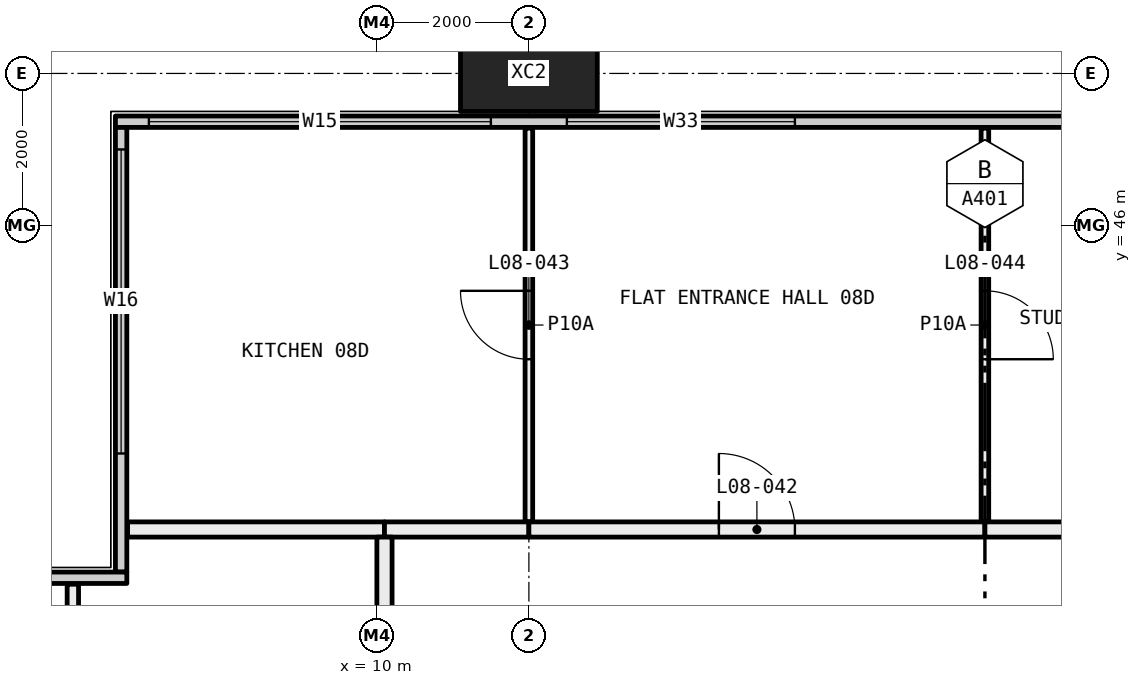
"""IFC4 building model, lengths in metres.
Left out: names, types, materials, properties, quantities, classifications, styles, units other than length and angle.
Written with IfcOpenShell. Run it as: python <this file> out.ifc"""

import sys

from ifc_helpers import new_model, si_unit, direction, frame, frame_2d, origin, origin_2d, place, context, subcontext, project, spatial, rectangle, hollow_rectangle, extrude, element, fill, save


model = new_model("IFC4")
c1 = context("Model", 3, precision=1e-05, world=origin(), true_north=direction((0.0, 1.0)))
c2 = subcontext(c1, "Body", "Model", "MODEL_VIEW")
j1 = project(units=[si_unit("LENGTHUNIT", "METRE"), si_unit("PLANEANGLEUNIT", "RADIAN")], contexts=[c1])
p1 = place(None, origin())
s1 = spatial("IfcSite", under=j1, at=p1, CompositionType="ELEMENT")
p2 = place(p1, origin())
s2 = spatial("IfcBuilding", under=s1, at=p2, CompositionType="ELEMENT")
p3 = place(p2, frame((0.0, 0.0, 40.35)))
s3 = spatial("IfcBuildingStorey", under=s2, at=p3, CompositionType="ELEMENT", Elevation=40.35)
p4 = place(p3, frame((12.0, 48.0, -0.4), z_axis=(0.0, 0.0, 1.0), x_axis=(1.0, 0.0, 0.0)))
e1 = element("IfcColumn", 1, at=p4, inside=s3, PredefinedType="COLUMN", context=c2, shape_type="SweptSolid", body=[
    extrude(hollow_rectangle(XDim=1.8, YDim=1.0, WallThickness=0.07, at=origin_2d()), origin(), (0.0, 0.0, 1.0), 3.45),
])
p5 = place(p3, frame((6.56, 47.365, 0.0), z_axis=(0.0, 0.0, 1.0), x_axis=(1.0, 0.0, 0.0)))
e2 = element("IfcWall", 2, at=p5, inside=s3, PredefinedType="ELEMENTEDWALL", context=c2, shape_type="SweptSolid", body=[
    extrude(rectangle(XDim=58.88, YDim=0.15, at=frame_2d((29.44, 0.0))), origin(), (0.0, 0.0, 1.0), 3.05),
])
p6 = place(p5, frame((0.44, 0.0, 0.45)))
e3 = element("IfcOpeningElement", 3, at=p6, cuts=e2, PredefinedType="OPENING", context=c2, shape_type="SweptSolid", body=[
    extrude(rectangle(XDim=4.5, YDim=2.55, at=frame_2d((2.25, 1.275))), frame((0.0, 0.085, 0.0), z_axis=(0.0, -1.0, 0.0), x_axis=(1.0, 0.0, 0.0)), (0.0, 0.0, 1.0), 0.17),
])
p7 = place(p5, frame((5.94, 0.0, 0.45)))
e4 = element("IfcOpeningElement", 4, at=p7, cuts=e2, PredefinedType="OPENING", context=c2, shape_type="SweptSolid", body=[
    extrude(rectangle(XDim=3.0, YDim=2.55, at=frame_2d((1.5, 1.275))), frame((0.0, 0.085, 0.0), z_axis=(0.0, -1.0, 0.0), x_axis=(1.0, 0.0, 0.0)), (0.0, 0.0, 1.0), 0.17),
])
p8 = place(p5, frame((13.94, 0.0, 0.45)))
e5 = element("IfcOpeningElement", 5, at=p8, cuts=e2, PredefinedType="OPENING", context=c2, shape_type="SweptSolid", body=[
    extrude(rectangle(XDim=3.0, YDim=2.55, at=frame_2d((1.5, 1.275))), frame((0.0, 0.085, 0.0), z_axis=(0.0, -1.0, 0.0), x_axis=(1.0, 0.0, 0.0)), (0.0, 0.0, 1.0), 0.17),
])
p9 = place(p5, frame((17.94, 0.0, 0.45)))
e6 = element("IfcOpeningElement", 6, at=p9, cuts=e2, PredefinedType="OPENING", context=c2, shape_type="SweptSolid", body=[
    extrude(rectangle(XDim=3.0, YDim=2.55, at=frame_2d((1.5, 1.275))), frame((0.0, 0.085, 0.0), z_axis=(0.0, -1.0, 0.0), x_axis=(1.0, 0.0, 0.0)), (0.0, 0.0, 1.0), 0.17),
])
p10 = place(p5, frame((26.94, 0.0, 0.45)))
e7 = element("IfcOpeningElement", 7, at=p10, cuts=e2, PredefinedType="OPENING", context=c2, shape_type="SweptSolid", body=[
    extrude(rectangle(XDim=2.0, YDim=2.55, at=frame_2d((1.0, 1.275))), frame((0.0, 0.085, 0.0), z_axis=(0.0, -1.0, 0.0), x_axis=(1.0, 0.0, 0.0)), (0.0, 0.0, 1.0), 0.17),
])
p11 = place(p5, frame((29.94, 0.0, 0.45)))
e8 = element("IfcOpeningElement", 8, at=p11, cuts=e2, PredefinedType="OPENING", context=c2, shape_type="SweptSolid", body=[
    extrude(rectangle(XDim=3.0, YDim=2.55, at=frame_2d((1.5, 1.275))), frame((0.0, 0.085, 0.0), z_axis=(0.0, -1.0, 0.0), x_axis=(1.0, 0.0, 0.0)), (0.0, 0.0, 1.0), 0.17),
])
p12 = place(p5, frame((37.94, 0.0, 0.45)))
e9 = element("IfcOpeningElement", 9, at=p12, cuts=e2, PredefinedType="OPENING", context=c2, shape_type="SweptSolid", body=[
    extrude(rectangle(XDim=3.0, YDim=2.55, at=frame_2d((1.5, 1.275))), frame((0.0, 0.085, 0.0), z_axis=(0.0, -1.0, 0.0), x_axis=(1.0, 0.0, 0.0)), (0.0, 0.0, 1.0), 0.17),
])
p13 = place(p5, frame((41.94, 0.0, 0.45)))
e10 = element("IfcOpeningElement", 10, at=p13, cuts=e2, PredefinedType="OPENING", context=c2, shape_type="SweptSolid", body=[
    extrude(rectangle(XDim=3.0, YDim=2.55, at=frame_2d((1.5, 1.275))), frame((0.0, 0.085, 0.0), z_axis=(0.0, -1.0, 0.0), x_axis=(1.0, 0.0, 0.0)), (0.0, 0.0, 1.0), 0.17),
])
p14 = place(p5, frame((50.94, 0.0, 0.45)))
e11 = element("IfcOpeningElement", 11, at=p14, cuts=e2, PredefinedType="OPENING", context=c2, shape_type="SweptSolid", body=[
    extrude(rectangle(XDim=2.0, YDim=2.55, at=frame_2d((1.0, 1.275))), frame((0.0, 0.085, 0.0), z_axis=(0.0, -1.0, 0.0), x_axis=(1.0, 0.0, 0.0)), (0.0, 0.0, 1.0), 0.17),
])
p15 = place(p5, frame((53.94, 0.0, 0.45)))
e12 = element("IfcOpeningElement", 12, at=p15, cuts=e2, PredefinedType="OPENING", context=c2, shape_type="SweptSolid", body=[
    extrude(rectangle(XDim=4.5, YDim=2.55, at=frame_2d((2.25, 1.275))), frame((0.0, 0.085, 0.0), z_axis=(0.0, -1.0, 0.0), x_axis=(1.0, 0.0, 0.0)), (0.0, 0.0, 1.0), 0.17),
])
p16 = place(p3, frame((6.635, 41.44, 0.0), z_axis=(0.0, 0.0, 1.0), x_axis=(0.0, 1.0, 0.0)))
e13 = element("IfcWall", 13, at=p16, inside=s3, PredefinedType="ELEMENTEDWALL", context=c2, shape_type="SweptSolid", body=[
    extrude(rectangle(XDim=5.85, YDim=0.15, at=frame_2d((2.925, 0.0))), origin(), (0.0, 0.0, 1.0), 3.05),
])
p17 = place(p16, frame((1.56, 0.0, 0.45)))
e14 = element("IfcOpeningElement", 14, at=p17, cuts=e13, PredefinedType="OPENING", context=c2, shape_type="SweptSolid", body=[
    extrude(rectangle(XDim=4.0, YDim=2.55, at=frame_2d((2.0, 1.275))), frame((0.0, 0.085, 0.0), z_axis=(0.0, -1.0, 0.0), x_axis=(1.0, 0.0, 0.0)), (0.0, 0.0, 1.0), 0.17),
])
p18 = place(p3, frame((0.56, 41.365, 0.0), z_axis=(0.0, 0.0, 1.0), x_axis=(1.0, 0.0, 0.0)))
e15 = element("IfcWall", 15, at=p18, inside=s3, PredefinedType="ELEMENTEDWALL", context=c2, shape_type="SweptSolid", body=[
    extrude(rectangle(XDim=6.15, YDim=0.15, at=frame_2d((3.075, 0.0))), origin(), (0.0, 0.0, 1.0), 3.05),
])
p19 = place(p18, frame((0.44, 0.0, 0.45)))
e16 = element("IfcOpeningElement", 16, at=p19, cuts=e15, PredefinedType="OPENING", context=c2, shape_type="SweptSolid", body=[
    extrude(rectangle(XDim=4.0, YDim=2.55, at=frame_2d((2.0, 1.275))), frame((0.0, 0.085, 0.0), z_axis=(0.0, -1.0, 0.0), x_axis=(1.0, 0.0, 0.0)), (0.0, 0.0, 1.0), 0.17),
])
p20 = place(p3, frame((12.0, 42.1, 0.0), z_axis=(0.0, 0.0, 1.0), x_axis=(0.0, 1.0, 0.0)))
e17 = element("IfcWall", 17, at=p20, inside=s3, PredefinedType="PARTITIONING", context=c2, shape_type="SweptSolid", body=[
    extrude(rectangle(XDim=5.18, YDim=0.1, at=frame_2d((2.59, 0.0))), origin(), (0.0, 0.0, 1.0), 3.05),
])
p21 = place(p20, frame((2.14, 0.0, 0.0)))
e18 = element("IfcOpeningElement", 18, at=p21, cuts=e17, PredefinedType="OPENING", context=c2, shape_type="SweptSolid", body=[
    extrude(rectangle(XDim=0.9, YDim=2.1, at=frame_2d((0.45, 1.05))), frame((0.0, 0.06, 0.0), z_axis=(0.0, -1.0, 0.0), x_axis=(1.0, 0.0, 0.0)), (0.0, 0.0, 1.0), 0.12),
])
p22 = place(p3, frame((6.72, 42.0, 0.0), z_axis=(0.0, 0.0, 1.0), x_axis=(1.0, 0.0, 0.0)))
e19 = element("IfcWall", 19, at=p22, inside=s3, PredefinedType="PARTITIONING", context=c2, shape_type="SweptSolid", body=[
    extrude(rectangle(XDim=3.38, YDim=0.2, at=frame_2d((1.69, 0.0))), origin(), (0.0, 0.0, 1.0), 3.05),
])
p23 = place(p3, frame((10.1, 42.0, 0.0), z_axis=(0.0, 0.0, 1.0), x_axis=(1.0, 0.0, 0.0)))
e20 = element("IfcWall", 20, at=p23, inside=s3, PredefinedType="PARTITIONING", context=c2, shape_type="SweptSolid", body=[
    extrude(rectangle(XDim=1.9, YDim=0.2, at=frame_2d((0.95, 0.0))), origin(), (0.0, 0.0, 1.0), 3.05),
])
p24 = place(p3, frame((18.0, 42.1, 0.0), z_axis=(0.0, 0.0, 1.0), x_axis=(0.0, 1.0, 0.0)))
e21 = element("IfcWall", 21, at=p24, inside=s3, PredefinedType="PARTITIONING", context=c2, shape_type="SweptSolid", body=[
    extrude(rectangle(XDim=5.18, YDim=0.1, at=frame_2d((2.59, 0.0))), origin(), (0.0, 0.0, 1.0), 3.05),
])
p25 = place(p24, frame((2.14, 0.0, 0.0)))
e22 = element("IfcOpeningElement", 22, at=p25, cuts=e21, PredefinedType="OPENING", context=c2, shape_type="SweptSolid", body=[
    extrude(rectangle(XDim=0.9, YDim=2.1, at=frame_2d((0.45, 1.05))), frame((0.0, 0.06, 0.0), z_axis=(0.0, -1.0, 0.0), x_axis=(1.0, 0.0, 0.0)), (0.0, 0.0, 1.0), 0.12),
])
p26 = place(p3, frame((12.0, 42.0, 0.0), z_axis=(0.0, 0.0, 1.0), x_axis=(1.0, 0.0, 0.0)))
e23 = element("IfcWall", 23, at=p26, inside=s3, PredefinedType="PARTITIONING", context=c2, shape_type="SweptSolid", body=[
    extrude(rectangle(XDim=6.0, YDim=0.2, at=frame_2d((3.0, 0.0))), origin(), (0.0, 0.0, 1.0), 3.05),
])
p27 = place(p26, frame((2.5, 0.0, 0.0)))
e24 = element("IfcOpeningElement", 24, at=p27, cuts=e23, PredefinedType="OPENING", context=c2, shape_type="SweptSolid", body=[
    extrude(rectangle(XDim=1.0, YDim=2.1, at=frame_2d((0.5, 1.05))), frame((0.0, 0.11, 0.0), z_axis=(0.0, -1.0, 0.0), x_axis=(1.0, 0.0, 0.0)), (0.0, 0.0, 1.0), 0.22),
])
p28 = place(p3, frame((18.0, 42.0, 0.0), z_axis=(0.0, 0.0, 1.0), x_axis=(1.0, 0.0, 0.0)))
e25 = element("IfcWall", 25, at=p28, inside=s3, PredefinedType="PARTITIONING", context=c2, shape_type="SweptSolid", body=[
    extrude(rectangle(XDim=6.0, YDim=0.2, at=frame_2d((3.0, 0.0))), origin(), (0.0, 0.0, 1.0), 3.05),
])
p29 = place(p3, frame((6.0, 37.5, 0.0), z_axis=(0.0, 0.0, 1.0), x_axis=(0.0, 1.0, 0.0)))
e26 = element("IfcWall", 26, at=p29, inside=s3, PredefinedType="PARTITIONING", context=c2, shape_type="SweptSolid", body=[
    extrude(rectangle(XDim=3.78, YDim=0.15, at=frame_2d((1.89, 0.0))), origin(), (0.0, 0.0, 1.0), 3.05),
])
p30 = place(p3, frame((10.1, 37.5, 0.0), z_axis=(0.0, 0.0, 1.0), x_axis=(0.0, 1.0, 0.0)))
e27 = element("IfcWall", 27, at=p30, inside=s3, PredefinedType="PARTITIONING", context=c2, shape_type="SweptSolid", body=[
    extrude(rectangle(XDim=4.4, YDim=0.2, at=frame_2d((2.2, 0.0))), origin(), (0.0, 0.0, 1.0), 3.05),
])
p31 = place(p6, origin())
e28 = element("IfcWindow", 28, at=p31, inside=s3, PartitioningType="SINGLE_PANEL", PredefinedType="WINDOW", context=c2, shape_type="SweptSolid", body=[
    extrude(rectangle(XDim=4.5, YDim=2.55, at=frame_2d((2.25, 1.275))), frame((0.0, 0.03, 0.0), z_axis=(0.0, -1.0, 0.0), x_axis=(1.0, 0.0, 0.0)), (0.0, 0.0, 1.0), 0.06),
])
fill(e3, e28)
p32 = place(p7, origin())
e29 = element("IfcWindow", 29, at=p32, inside=s3, PartitioningType="SINGLE_PANEL", PredefinedType="WINDOW", context=c2, shape_type="SweptSolid", body=[
    extrude(rectangle(XDim=3.0, YDim=2.55, at=frame_2d((1.5, 1.275))), frame((0.0, 0.03, 0.0), z_axis=(0.0, -1.0, 0.0), x_axis=(1.0, 0.0, 0.0)), (0.0, 0.0, 1.0), 0.06),
])
fill(e4, e29)
p33 = place(p17, origin())
e30 = element("IfcWindow", 30, at=p33, inside=s3, PartitioningType="SINGLE_PANEL", PredefinedType="WINDOW", context=c2, shape_type="SweptSolid", body=[
    extrude(rectangle(XDim=4.0, YDim=2.55, at=frame_2d((2.0, 1.275))), frame((0.0, 0.03, 0.0), z_axis=(0.0, -1.0, 0.0), x_axis=(1.0, 0.0, 0.0)), (0.0, 0.0, 1.0), 0.06),
])
fill(e14, e30)
p34 = place(p27, origin())
e31 = element("IfcDoor", 31, at=p34, inside=s3, OperationType="SINGLE_SWING_RIGHT", PredefinedType="DOOR", context=c2, shape_type="SweptSolid", body=[
    extrude(rectangle(XDim=1.0, YDim=2.1, at=frame_2d((0.5, 1.05))), frame((0.0, 0.025, 0.0), z_axis=(0.0, -1.0, 0.0), x_axis=(1.0, 0.0, 0.0)), (0.0, 0.0, 1.0), 0.05),
])
fill(e24, e31)
p35 = place(p21, origin())
e32 = element("IfcDoor", 32, at=p35, inside=s3, OperationType="SINGLE_SWING_LEFT", PredefinedType="DOOR", context=c2, shape_type="SweptSolid", body=[
    extrude(rectangle(XDim=0.9, YDim=2.1, at=frame_2d((0.45, 1.05))), frame((0.0, 0.025, 0.0), z_axis=(0.0, -1.0, 0.0), x_axis=(1.0, 0.0, 0.0)), (0.0, 0.0, 1.0), 0.05),
])
fill(e18, e32)
p36 = place(p25, frame((0.9, 0.0, 0.0), x_axis=(-1.0, 0.0, 0.0)))
e33 = element("IfcDoor", 33, at=p36, inside=s3, OperationType="SINGLE_SWING_LEFT", PredefinedType="DOOR", context=c2, shape_type="SweptSolid", body=[
    extrude(rectangle(XDim=0.9, YDim=2.1, at=frame_2d((0.45, 1.05))), frame((0.0, 0.025, 0.0), z_axis=(0.0, -1.0, 0.0), x_axis=(1.0, 0.0, 0.0)), (0.0, 0.0, 1.0), 0.05),
])
fill(e22, e33)
save(model, sys.argv[1])
